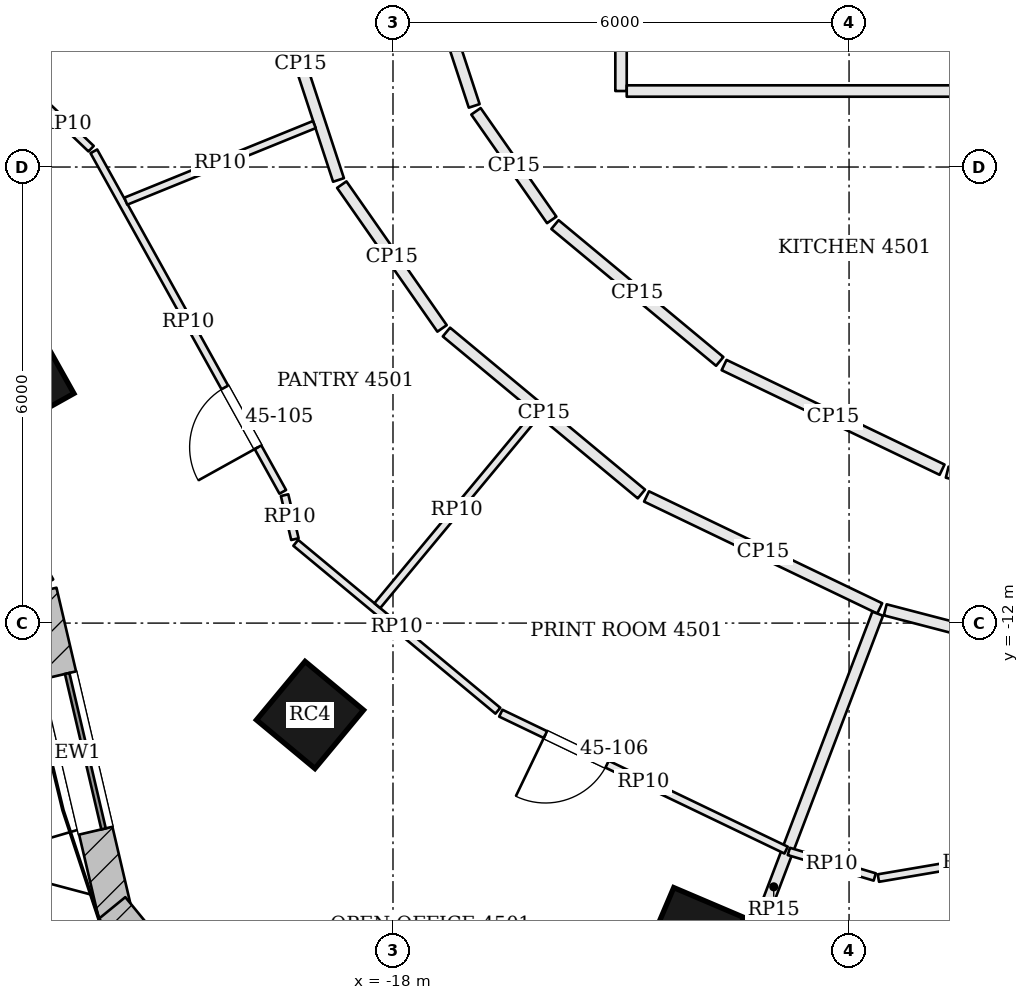
"""IFC4 building model, lengths in metres.
Left out: names, types, materials, properties, quantities, classifications, styles, units other than length and angle.
Written with IfcOpenShell. Run it as: python <this file> out.ifc"""

import sys

from ifc_helpers import new_model, si_unit, direction, frame, frame_2d, origin, origin_2d, place, context, subcontext, project, spatial, rectangle, extrude, element, fill, save


model = new_model("IFC4")
c1 = context("Model", 3, precision=1e-05, world=origin(), true_north=direction((0.0, 1.0)))
c2 = subcontext(c1, "Body", "Model", "MODEL_VIEW")
j1 = project(units=[si_unit("LENGTHUNIT", "METRE"), si_unit("PLANEANGLEUNIT", "RADIAN")], contexts=[c1])
p1 = place(None, origin())
s1 = spatial("IfcSite", under=j1, at=p1, CompositionType="ELEMENT")
p2 = place(p1, origin())
s2 = spatial("IfcBuilding", under=s1, at=p2, CompositionType="ELEMENT")
p3 = place(p2, frame((0.0, 0.0, 185.7)))
s3 = spatial("IfcBuildingStorey", under=s2, at=p3, CompositionType="ELEMENT", Elevation=185.7)
for number, where, z_axis, x_axis in (
    (1, (-22.879, -8.787, 0.0), (0.0, 0.0, 1.0), (0.489, -0.873, 0.0)),
    (2, (-19.092, -13.209, 0.0), (0.0, 0.0, 1.0), (0.769, -0.639, 0.0)),
    (3, (-14.042, -16.136, 0.0), (0.0, 0.0, 1.0), (0.92, -0.392, 0.0)),
):
    element("IfcColumn", number, at=place(p3, frame(where, z_axis=z_axis, x_axis=x_axis)), inside=s3, PredefinedType="COLUMN", context=c2, shape_type="SweptSolid", body=[
        extrude(rectangle(XDim=1.0, YDim=1.0, at=origin_2d()), origin(), (0.0, 0.0, 1.0), 3.9),
    ])
p4 = place(p3, frame((-24.662, -7.939, 0.0), z_axis=(0.0, 0.0, 1.0), x_axis=(0.485153910721, -0.874428775208, 0.0)))
e4 = element("IfcWall", 4, at=p4, inside=s3, PredefinedType="SOLIDWALL", context=c2, shape_type="SweptSolid", body=[
    extrude(rectangle(XDim=4.112, YDim=0.45, at=frame_2d((2.056, 0.0))), origin(), (0.0, 0.0, 1.0), 3.7),
])
p5 = place(p4, frame((1.006, 0.0, 0.9)))
e5 = element("IfcOpeningElement", 5, at=p5, cuts=e4, PredefinedType="OPENING", context=c2, shape_type="SweptSolid", body=[
    extrude(rectangle(XDim=2.1, YDim=2.3, at=frame_2d((1.05, 1.15))), frame((0.0, 0.235, 0.0), z_axis=(0.0, -1.0, 0.0), x_axis=(1.0, 0.0, 0.0)), (0.0, 0.0, 1.0), 0.47),
])
p6 = place(p3, frame((-22.646, -11.586, 0.0), z_axis=(0.0, 0.0, 1.0), x_axis=(0.227925124198, -0.973678662475, 0.0)))
e6 = element("IfcWall", 6, at=p6, inside=s3, PredefinedType="SOLIDWALL", context=c2, shape_type="SweptSolid", body=[
    extrude(rectangle(XDim=4.361, YDim=0.45, at=frame_2d((2.18, 0.0))), origin(), (0.0, 0.0, 1.0), 3.7),
])
p7 = place(p6, frame((1.13, 0.0, 0.9)))
e7 = element("IfcOpeningElement", 7, at=p7, cuts=e6, PredefinedType="OPENING", context=c2, shape_type="SweptSolid", body=[
    extrude(rectangle(XDim=2.1, YDim=2.3, at=frame_2d((1.05, 1.15))), frame((0.0, 0.235, 0.0), z_axis=(0.0, -1.0, 0.0), x_axis=(1.0, 0.0, 0.0)), (0.0, 0.0, 1.0), 0.47),
])
p8 = place(p3, frame((-21.696, -15.748, 0.0), z_axis=(0.0, 0.0, 1.0), x_axis=(0.632968710519, -0.774177377288, 0.0)))
e8 = element("IfcWall", 8, at=p8, inside=s3, PredefinedType="SOLIDWALL", context=c2, shape_type="SweptSolid", body=[
    extrude(rectangle(XDim=4.25, YDim=0.45, at=frame_2d((2.125, 0.0))), origin(), (0.0, 0.0, 1.0), 3.7),
])
p9 = place(p8, frame((1.075, 0.0, 0.9)))
e9 = element("IfcOpeningElement", 9, at=p9, cuts=e8, PredefinedType="OPENING", context=c2, shape_type="SweptSolid", body=[
    extrude(rectangle(XDim=2.1, YDim=2.3, at=frame_2d((1.05, 1.15))), frame((0.0, 0.235, 0.0), z_axis=(0.0, -1.0, 0.0), x_axis=(1.0, 0.0, 0.0)), (0.0, 0.0, 1.0), 0.47),
])
p10 = place(p3, frame((-19.717, -3.124, 0.0), z_axis=(0.0, 0.0, 1.0), x_axis=(0.31188427026, -0.950120098706, 0.0)))
e10 = element("IfcWall", 10, at=p10, inside=s3, PredefinedType="PARTITIONING", context=c2, shape_type="SweptSolid", body=[
    extrude(rectangle(XDim=3.206, YDim=0.15, at=frame_2d((1.603, 0.0))), origin(), (0.0, 0.0, 1.0), 3.084),
])
p11 = place(p3, frame((-18.674, -6.232, 0.0), z_axis=(0.0, 0.0, 1.0), x_axis=(0.572118665737, -0.820170855563, 0.0)))
e11 = element("IfcWall", 11, at=p11, inside=s3, PredefinedType="PARTITIONING", context=c2, shape_type="SweptSolid", body=[
    extrude(rectangle(XDim=2.306, YDim=0.15, at=frame_2d((1.153, 0.0))), origin(), (0.0, 0.0, 1.0), 3.084),
])
p12 = place(p3, frame((-17.297, -8.171, 0.0), z_axis=(0.0, 0.0, 1.0), x_axis=(0.769228575061, -0.638973707839, 0.0)))
e12 = element("IfcWall", 12, at=p12, inside=s3, PredefinedType="PARTITIONING", context=c2, shape_type="SweptSolid", body=[
    extrude(rectangle(XDim=3.334, YDim=0.15, at=frame_2d((1.667, 0.0))), origin(), (0.0, 0.0, 1.0), 3.084),
])
p13 = place(p3, frame((-14.664, -10.334, 0.0), z_axis=(0.0, 0.0, 1.0), x_axis=(0.901500664489, -0.43277771653, 0.0)))
e13 = element("IfcWall", 13, at=p13, inside=s3, PredefinedType="PARTITIONING", context=c2, shape_type="SweptSolid", body=[
    extrude(rectangle(XDim=3.403, YDim=0.15, at=frame_2d((1.701, 0.0))), origin(), (0.0, 0.0, 1.0), 3.084),
])
p14 = place(p3, frame((-14.359, -19.063, 0.0), z_axis=(0.0, 0.0, 1.0), x_axis=(0.355747085176, 0.934582265715, 0.0)))
e14 = element("IfcWall", 14, at=p14, inside=s3, PredefinedType="PARTITIONING", context=c2, shape_type="SweptSolid", body=[
    extrude(rectangle(XDim=7.689, YDim=0.15, at=frame_2d((3.844, 0.0))), origin(), (0.0, 0.0, 1.0), 3.084),
])
p15 = place(p3, frame((-11.524, -11.825, 0.0), z_axis=(0.0, 0.0, 1.0), x_axis=(0.967712002698, -0.252058484948, 0.0)))
e15 = element("IfcWall", 15, at=p15, inside=s3, PredefinedType="PARTITIONING", context=c2, shape_type="SweptSolid", body=[
    extrude(rectangle(XDim=4.868, YDim=0.15, at=frame_2d((2.434, 0.0))), origin(), (0.0, 0.0, 1.0), 3.084),
])
p16 = place(p15, frame((2.6, 0.0, 0.0)))
e16 = element("IfcOpeningElement", 16, at=p16, cuts=e15, PredefinedType="OPENING", context=c2, shape_type="SweptSolid", body=[
    extrude(rectangle(XDim=1.8, YDim=2.1, at=frame_2d((0.9, 1.05))), frame((0.0, 0.085, 0.0), z_axis=(0.0, -1.0, 0.0), x_axis=(1.0, 0.0, 0.0)), (0.0, 0.0, 1.0), 0.17),
])
p17 = place(p3, frame((-6.553, -11.056, 0.0), z_axis=(0.0, 0.0, 1.0), x_axis=(-0.970004917182, 0.243085294995, 0.0)))
e17 = element("IfcWall", 17, at=p17, inside=s3, PredefinedType="PARTITIONING", context=c2, shape_type="SweptSolid", body=[
    extrude(rectangle(XDim=4.284, YDim=0.15, at=frame_2d((2.142, 0.0))), origin(), (0.0, 0.0, 1.0), 3.084),
])
p18 = place(p3, frame((-10.776, -9.982, 0.0), z_axis=(0.0, 0.0, 1.0), x_axis=(-0.901511079436, 0.432756020933, 0.0)))
e18 = element("IfcWall", 18, at=p18, inside=s3, PredefinedType="PARTITIONING", context=c2, shape_type="SweptSolid", body=[
    extrude(rectangle(XDim=3.181, YDim=0.15, at=frame_2d((1.59, 0.0))), origin(), (0.0, 0.0, 1.0), 3.084),
])
p19 = place(p3, frame((-13.702, -8.557, 0.0), z_axis=(0.0, 0.0, 1.0), x_axis=(-0.769221825067, 0.638981833733, 0.0)))
e19 = element("IfcWall", 19, at=p19, inside=s3, PredefinedType="PARTITIONING", context=c2, shape_type="SweptSolid", body=[
    extrude(rectangle(XDim=2.817, YDim=0.15, at=frame_2d((1.409, 0.0))), origin(), (0.0, 0.0, 1.0), 3.084),
])
p20 = place(p3, frame((-15.912, -6.696, 0.0), z_axis=(0.0, 0.0, 1.0), x_axis=(-0.572078533763, 0.820198848578, 0.0)))
e20 = element("IfcWall", 20, at=p20, inside=s3, PredefinedType="PARTITIONING", context=c2, shape_type="SweptSolid", body=[
    extrude(rectangle(XDim=1.742, YDim=0.15, at=frame_2d((0.871, 0.0))), origin(), (0.0, 0.0, 1.0), 3.084),
])
p21 = place(p3, frame((-16.932, -5.196, 0.0), z_axis=(0.0, 0.0, 1.0), x_axis=(-0.311904957484, 0.950113307715, 0.0)))
e21 = element("IfcWall", 21, at=p21, inside=s3, PredefinedType="PARTITIONING", context=c2, shape_type="SweptSolid", body=[
    extrude(rectangle(XDim=2.662, YDim=0.15, at=frame_2d((1.331, 0.0))), origin(), (0.0, 0.0, 1.0), 3.084),
])
p22 = place(p3, frame((-15.0, 7.423, 0.0), z_axis=(0.0, 0.0, 1.0), x_axis=(0.0, -1.0, 0.0)))
e22 = element("IfcWall", 22, at=p22, inside=s3, PredefinedType="PARTITIONING", context=c2, shape_type="SweptSolid", body=[
    extrude(rectangle(XDim=12.423, YDim=0.15, at=frame_2d((6.211, 0.0))), origin(), (0.0, 0.0, 1.0), 3.084),
])
p23 = place(p22, frame((5.674, 0.0, 0.0)))
e23 = element("IfcOpeningElement", 23, at=p23, cuts=e22, PredefinedType="OPENING", context=c2, shape_type="SweptSolid", body=[
    extrude(rectangle(XDim=1.0, YDim=2.1, at=frame_2d((0.5, 1.05))), frame((0.0, 0.085, 0.0), z_axis=(0.0, -1.0, 0.0), x_axis=(1.0, 0.0, 0.0)), (0.0, 0.0, 1.0), 0.17),
])
p24 = place(p3, frame((-14.925, -5.0, 0.0), z_axis=(0.0, 0.0, 1.0), x_axis=(1.0, 0.0, 0.0)))
e24 = element("IfcWall", 24, at=p24, inside=s3, PredefinedType="PARTITIONING", context=c2, shape_type="SweptSolid", body=[
    extrude(rectangle(XDim=29.925, YDim=0.15, at=frame_2d((14.962, 0.0))), origin(), (0.0, 0.0, 1.0), 3.084),
])
p25 = place(p24, frame((14.025, 0.0, 0.0)))
e25 = element("IfcOpeningElement", 25, at=p25, cuts=e24, PredefinedType="OPENING", context=c2, shape_type="SweptSolid", body=[
    extrude(rectangle(XDim=1.8, YDim=2.1, at=frame_2d((0.9, 1.05))), frame((0.0, 0.085, 0.0), z_axis=(0.0, -1.0, 0.0), x_axis=(1.0, 0.0, 0.0)), (0.0, 0.0, 1.0), 0.17),
])
p26 = place(p3, frame((-12.829, -14.987, 0.0), z_axis=(0.0, 0.0, 1.0), x_axis=(-0.901501094212, 0.432776821393, 0.0)))
e26 = element("IfcWall", 26, at=p26, inside=s3, PredefinedType="PARTITIONING", context=c2, shape_type="SweptSolid", body=[
    extrude(rectangle(XDim=4.163, YDim=0.1, at=frame_2d((2.082, 0.0))), origin(), (0.0, 0.0, 1.0), 3.084),
])
p27 = place(p26, frame((2.612, 0.0, 0.0)))
e27 = element("IfcOpeningElement", 27, at=p27, cuts=e26, PredefinedType="OPENING", context=c2, shape_type="SweptSolid", body=[
    extrude(rectangle(XDim=0.9, YDim=2.1, at=frame_2d((0.45, 1.05))), frame((0.0, 0.06, 0.0), z_axis=(0.0, -1.0, 0.0), x_axis=(1.0, 0.0, 0.0)), (0.0, 0.0, 1.0), 0.12),
])
p28 = place(p3, frame((-16.62, -13.153, 0.0), z_axis=(0.0, 0.0, 1.0), x_axis=(-0.769221883728, 0.638981763115, 0.0)))
e28 = element("IfcWall", 28, at=p28, inside=s3, PredefinedType="PARTITIONING", context=c2, shape_type="SweptSolid", body=[
    extrude(rectangle(XDim=3.457, YDim=0.1, at=frame_2d((1.728, 0.0))), origin(), (0.0, 0.0, 1.0), 3.084),
])
p29 = place(p3, frame((-19.291, -10.896, 0.0), z_axis=(0.0, 0.0, 1.0), x_axis=(-0.228008771428, 0.97365907799, 0.0)))
e29 = element("IfcWall", 29, at=p29, inside=s3, PredefinedType="PARTITIONING", context=c2, shape_type="SweptSolid", body=[
    extrude(rectangle(XDim=0.594, YDim=0.1, at=frame_2d((0.297, 0.0))), origin(), (0.0, 0.0, 1.0), 3.084),
])
p30 = place(p3, frame((-19.45, -10.273, 0.0), z_axis=(0.0, 0.0, 1.0), x_axis=(-0.485137067925, 0.87443811978, 0.0)))
e30 = element("IfcWall", 30, at=p30, inside=s3, PredefinedType="PARTITIONING", context=c2, shape_type="SweptSolid", body=[
    extrude(rectangle(XDim=5.123, YDim=0.1, at=frame_2d((2.562, 0.0))), origin(), (0.0, 0.0, 1.0), 3.084),
])
p31 = place(p30, frame((0.671, 0.0, 0.0)))
e31 = element("IfcOpeningElement", 31, at=p31, cuts=e30, PredefinedType="OPENING", context=c2, shape_type="SweptSolid", body=[
    extrude(rectangle(XDim=0.9, YDim=2.1, at=frame_2d((0.45, 1.05))), frame((0.0, 0.06, 0.0), z_axis=(0.0, -1.0, 0.0), x_axis=(1.0, 0.0, 0.0)), (0.0, 0.0, 1.0), 0.12),
])
p32 = place(p3, frame((-21.972, -5.759, 0.0), z_axis=(0.0, 0.0, 1.0), x_axis=(-0.722767970173, 0.691090776448, 0.0)))
e32 = element("IfcWall", 32, at=p32, inside=s3, PredefinedType="PARTITIONING", context=c2, shape_type="SweptSolid", body=[
    extrude(rectangle(XDim=0.925, YDim=0.1, at=frame_2d((0.462, 0.0))), origin(), (0.0, 0.0, 1.0), 3.084),
])
p33 = place(p3, frame((-19.035, -5.441, 0.0), z_axis=(0.0, 0.0, 1.0), x_axis=(-0.926424831259, -0.376479789667, 0.0)))
e33 = element("IfcWall", 33, at=p33, inside=s3, PredefinedType="PARTITIONING", context=c2, shape_type="SweptSolid", body=[
    extrude(rectangle(XDim=2.677, YDim=0.1, at=frame_2d((1.338, 0.0))), origin(), (0.0, 0.0, 1.0), 3.084),
])
p34 = place(p3, frame((-16.114, -9.251, 0.0), z_axis=(0.0, 0.0, 1.0), x_axis=(-0.6387387217, -0.769423709929, 0.0)))
e34 = element("IfcWall", 34, at=p34, inside=s3, PredefinedType="PARTITIONING", context=c2, shape_type="SweptSolid", body=[
    extrude(rectangle(XDim=3.275, YDim=0.1, at=frame_2d((1.637, 0.0))), origin(), (0.0, 0.0, 1.0), 3.084),
])
p35 = place(p3, frame((-9.245, -14.952, 0.0), z_axis=(0.0, 0.0, 1.0), x_axis=(-0.985850474782, -0.167627090209, 0.0)))
e35 = element("IfcWall", 35, at=p35, inside=s3, PredefinedType="PARTITIONING", context=c2, shape_type="SweptSolid", body=[
    extrude(rectangle(XDim=2.403, YDim=0.1, at=frame_2d((1.202, 0.0))), origin(), (0.0, 0.0, 1.0), 3.084),
])
p36 = place(p3, frame((-11.662, -15.34, 0.0), z_axis=(0.0, 0.0, 1.0), x_axis=(-0.95854705676, 0.284934273083, 0.0)))
e36 = element("IfcWall", 36, at=p36, inside=s3, PredefinedType="PARTITIONING", context=c2, shape_type="SweptSolid", body=[
    extrude(rectangle(XDim=1.179, YDim=0.1, at=frame_2d((0.589, 0.0))), origin(), (0.0, 0.0, 1.0), 3.084),
])
p37 = place(p7, origin())
e37 = element("IfcWindow", 37, at=p37, inside=s3, PartitioningType="SINGLE_PANEL", PredefinedType="WINDOW", context=c2, shape_type="SweptSolid", body=[
    extrude(rectangle(XDim=2.1, YDim=2.3, at=frame_2d((1.05, 1.15))), frame((0.0, 0.135, 0.0), z_axis=(0.0, -1.0, 0.0), x_axis=(1.0, 0.0, 0.0)), (0.0, 0.0, 1.0), 0.06),
])
fill(e7, e37)
p38 = place(p31, origin())
e38 = element("IfcDoor", 38, at=p38, inside=s3, OperationType="SINGLE_SWING_LEFT", PredefinedType="DOOR", context=c2, shape_type="SweptSolid", body=[
    extrude(rectangle(XDim=0.9, YDim=2.1, at=frame_2d((0.45, 1.05))), frame((0.0, 0.025, 0.0), z_axis=(0.0, -1.0, 0.0), x_axis=(1.0, 0.0, 0.0)), (0.0, 0.0, 1.0), 0.05),
])
fill(e31, e38)
p39 = place(p27, origin())
e39 = element("IfcDoor", 39, at=p39, inside=s3, OperationType="SINGLE_SWING_RIGHT", PredefinedType="DOOR", context=c2, shape_type="SweptSolid", body=[
    extrude(rectangle(XDim=0.9, YDim=2.1, at=frame_2d((0.45, 1.05))), frame((0.0, 0.025, 0.0), z_axis=(0.0, -1.0, 0.0), x_axis=(1.0, 0.0, 0.0)), (0.0, 0.0, 1.0), 0.05),
])
fill(e27, e39)
save(model, sys.argv[1])
